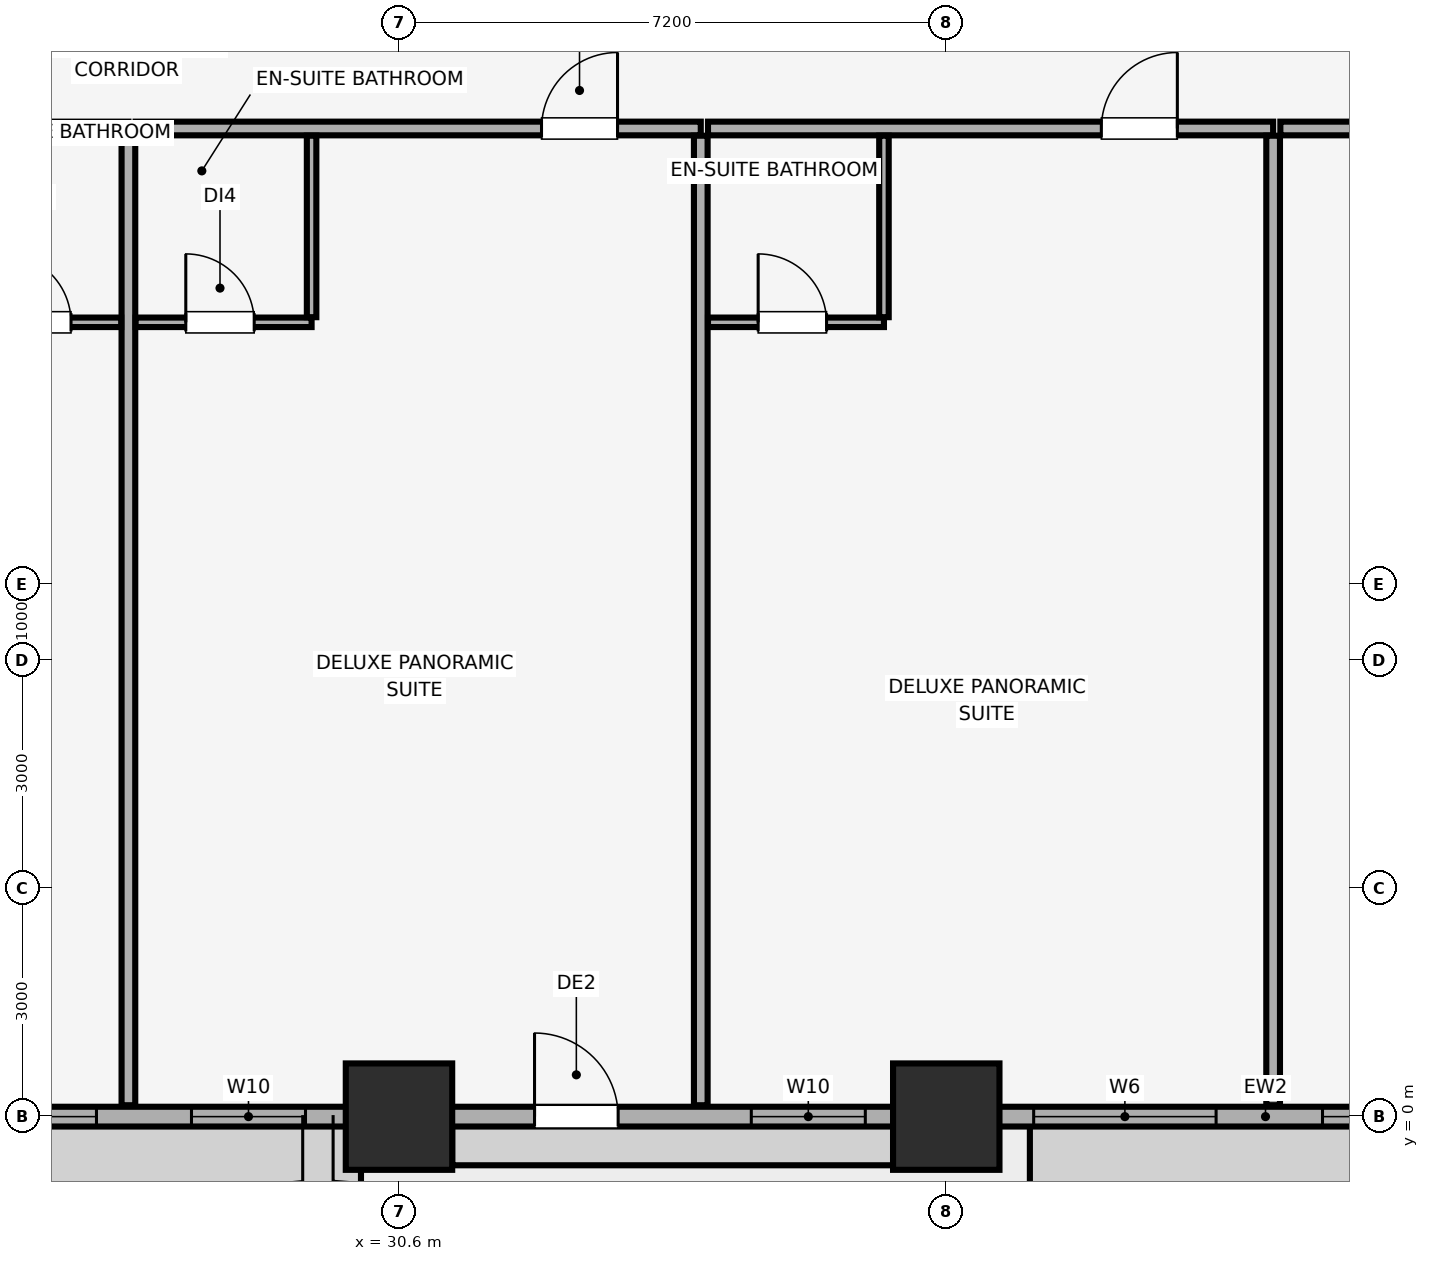
"""IFC4 building model, lengths in metres.
Left out: names, types, materials, properties, quantities, classifications, styles, units other than length and angle.
Written with IfcOpenShell. Run it as: python <this file> out.ifc"""

import sys

from ifc_helpers import new_model, si_unit, direction, frame, frame_2d, origin, origin_2d, place, context, subcontext, project, spatial, rectangle, extrude, element, fill, save


model = new_model("IFC4")
c1 = context("Model", 3, precision=1e-05, world=origin(), true_north=direction((0.0, 1.0)))
c2 = subcontext(c1, "Body", "Model", "MODEL_VIEW")
j1 = project(units=[si_unit("LENGTHUNIT", "METRE"), si_unit("PLANEANGLEUNIT", "RADIAN")], contexts=[c1])
p1 = place(None, origin())
s1 = spatial("IfcSite", under=j1, at=p1, CompositionType="ELEMENT")
p2 = place(p1, origin())
s2 = spatial("IfcBuilding", under=s1, at=p2, CompositionType="ELEMENT")
p3 = place(p2, frame((0.0, 0.0, 68.9)))
s3 = spatial("IfcBuildingStorey", under=s2, at=p3, CompositionType="ELEMENT", Elevation=68.9)
for number, where, z_axis, x_axis in (
    (1, (30.6, 0.0, 0.0), (0.0, 0.0, 1.0), (1.0, 0.0, 0.0)),
    (2, (37.8, 0.0, 0.0), (0.0, 0.0, 1.0), (1.0, 0.0, 0.0)),
):
    element("IfcColumn", number, at=place(p3, frame(where, z_axis=z_axis, x_axis=x_axis)), inside=s3, PredefinedType="COLUMN", context=c2, shape_type="SweptSolid", body=[
        extrude(rectangle(XDim=1.4, YDim=1.4, at=origin_2d()), origin(), (0.0, 0.0, 1.0), 3.51),
    ])
p4 = place(p3, frame((4.2, 0.0, 0.0), z_axis=(0.0, 0.0, 1.0), x_axis=(1.0, 0.0, 0.0)))
e3 = element("IfcWall", 3, at=p4, inside=s3, PredefinedType="SOLIDWALL", context=c2, shape_type="SweptSolid", body=[
    extrude(rectangle(XDim=75.6, YDim=0.26, at=frame_2d((37.8, 0.0))), origin(), (0.0, 0.0, 1.0), 2.56),
])
p5 = place(p4, frame((13.517, 0.0, 0.0)))
e4 = element("IfcOpeningElement", 4, at=p5, cuts=e3, PredefinedType="OPENING", context=c2, shape_type="SweptSolid", body=[
    extrude(rectangle(XDim=1.1, YDim=2.15, at=frame_2d((0.55, 1.075))), frame((0.0, 0.14, 0.0), z_axis=(0.0, -1.0, 0.0), x_axis=(1.0, 0.0, 0.0)), (0.0, 0.0, 1.0), 0.28),
])
p6 = place(p4, frame((28.183, 0.0, 0.0)))
e5 = element("IfcOpeningElement", 5, at=p6, cuts=e3, PredefinedType="OPENING", context=c2, shape_type="SweptSolid", body=[
    extrude(rectangle(XDim=1.1, YDim=2.15, at=frame_2d((0.55, 1.075))), frame((0.0, 0.14, 0.0), z_axis=(0.0, -1.0, 0.0), x_axis=(1.0, 0.0, 0.0)), (0.0, 0.0, 1.0), 0.28),
])
p7 = place(p4, frame((58.094, 0.0, 0.0)))
e6 = element("IfcOpeningElement", 6, at=p7, cuts=e3, PredefinedType="OPENING", context=c2, shape_type="SweptSolid", body=[
    extrude(rectangle(XDim=1.1, YDim=2.15, at=frame_2d((0.55, 1.075))), frame((0.0, 0.14, 0.0), z_axis=(0.0, -1.0, 0.0), x_axis=(1.0, 0.0, 0.0)), (0.0, 0.0, 1.0), 0.28),
])
p8 = place(p4, frame((1.035, 0.0, 0.85)))
e7 = element("IfcOpeningElement", 7, at=p8, cuts=e3, PredefinedType="OPENING", context=c2, shape_type="SweptSolid", body=[
    extrude(rectangle(XDim=2.4, YDim=1.5, at=frame_2d((1.2, 0.75))), frame((0.0, 0.14, 0.0), z_axis=(0.0, -1.0, 0.0), x_axis=(1.0, 0.0, 0.0)), (0.0, 0.0, 1.0), 0.28),
])
p9 = place(p4, frame((5.74, 0.0, 0.85)))
e8 = element("IfcOpeningElement", 8, at=p9, cuts=e3, PredefinedType="OPENING", context=c2, shape_type="SweptSolid", body=[
    extrude(rectangle(XDim=1.5, YDim=1.4, at=frame_2d((0.75, 0.7))), frame((0.0, 0.14, 0.0), z_axis=(0.0, -1.0, 0.0), x_axis=(1.0, 0.0, 0.0)), (0.0, 0.0, 1.0), 0.28),
])
p10 = place(p4, frame((8.49, 0.0, 0.85)))
e9 = element("IfcOpeningElement", 9, at=p10, cuts=e3, PredefinedType="OPENING", context=c2, shape_type="SweptSolid", body=[
    extrude(rectangle(XDim=2.4, YDim=1.5, at=frame_2d((1.2, 0.75))), frame((0.0, 0.14, 0.0), z_axis=(0.0, -1.0, 0.0), x_axis=(1.0, 0.0, 0.0)), (0.0, 0.0, 1.0), 0.28),
])
p11 = place(p4, frame((15.855, 0.0, 0.85)))
e10 = element("IfcOpeningElement", 10, at=p11, cuts=e3, PredefinedType="OPENING", context=c2, shape_type="SweptSolid", body=[
    extrude(rectangle(XDim=2.4, YDim=1.5, at=frame_2d((1.2, 0.75))), frame((0.0, 0.14, 0.0), z_axis=(0.0, -1.0, 0.0), x_axis=(1.0, 0.0, 0.0)), (0.0, 0.0, 1.0), 0.28),
])
p12 = place(p4, frame((20.02, 0.0, 0.85)))
e11 = element("IfcOpeningElement", 11, at=p12, cuts=e3, PredefinedType="OPENING", context=c2, shape_type="SweptSolid", body=[
    extrude(rectangle(XDim=2.4, YDim=1.5, at=frame_2d((1.2, 0.75))), frame((0.0, 0.14, 0.0), z_axis=(0.0, -1.0, 0.0), x_axis=(1.0, 0.0, 0.0)), (0.0, 0.0, 1.0), 0.28),
])
p13 = place(p4, frame((23.67, 0.0, 0.85)))
e12 = element("IfcOpeningElement", 12, at=p13, cuts=e3, PredefinedType="OPENING", context=c2, shape_type="SweptSolid", body=[
    extrude(rectangle(XDim=1.5, YDim=1.4, at=frame_2d((0.75, 0.7))), frame((0.0, 0.14, 0.0), z_axis=(0.0, -1.0, 0.0), x_axis=(1.0, 0.0, 0.0)), (0.0, 0.0, 1.0), 0.28),
])
p14 = place(p4, frame((31.035, 0.0, 0.85)))
e13 = element("IfcOpeningElement", 13, at=p14, cuts=e3, PredefinedType="OPENING", context=c2, shape_type="SweptSolid", body=[
    extrude(rectangle(XDim=1.5, YDim=1.4, at=frame_2d((0.75, 0.7))), frame((0.0, 0.14, 0.0), z_axis=(0.0, -1.0, 0.0), x_axis=(1.0, 0.0, 0.0)), (0.0, 0.0, 1.0), 0.28),
])
p15 = place(p4, frame((34.75, 0.0, 0.85)))
e14 = element("IfcOpeningElement", 14, at=p15, cuts=e3, PredefinedType="OPENING", context=c2, shape_type="SweptSolid", body=[
    extrude(rectangle(XDim=2.4, YDim=1.5, at=frame_2d((1.2, 0.75))), frame((0.0, 0.14, 0.0), z_axis=(0.0, -1.0, 0.0), x_axis=(1.0, 0.0, 0.0)), (0.0, 0.0, 1.0), 0.28),
])
p16 = place(p4, frame((38.55, 0.0, 0.85)))
e15 = element("IfcOpeningElement", 15, at=p16, cuts=e3, PredefinedType="OPENING", context=c2, shape_type="SweptSolid", body=[
    extrude(rectangle(XDim=2.4, YDim=1.5, at=frame_2d((1.2, 0.75))), frame((0.0, 0.14, 0.0), z_axis=(0.0, -1.0, 0.0), x_axis=(1.0, 0.0, 0.0)), (0.0, 0.0, 1.0), 0.28),
])
p17 = place(p4, frame((43.165, 0.0, 0.85)))
e16 = element("IfcOpeningElement", 16, at=p17, cuts=e3, PredefinedType="OPENING", context=c2, shape_type="SweptSolid", body=[
    extrude(rectangle(XDim=1.5, YDim=1.4, at=frame_2d((0.75, 0.7))), frame((0.0, 0.14, 0.0), z_axis=(0.0, -1.0, 0.0), x_axis=(1.0, 0.0, 0.0)), (0.0, 0.0, 1.0), 0.28),
])
p18 = place(p4, frame((45.915, 0.0, 0.85)))
e17 = element("IfcOpeningElement", 17, at=p18, cuts=e3, PredefinedType="OPENING", context=c2, shape_type="SweptSolid", body=[
    extrude(rectangle(XDim=2.4, YDim=1.5, at=frame_2d((1.2, 0.75))), frame((0.0, 0.14, 0.0), z_axis=(0.0, -1.0, 0.0), x_axis=(1.0, 0.0, 0.0)), (0.0, 0.0, 1.0), 0.28),
])
p19 = place(p4, frame((50.081, 0.0, 0.85)))
e18 = element("IfcOpeningElement", 18, at=p19, cuts=e3, PredefinedType="OPENING", context=c2, shape_type="SweptSolid", body=[
    extrude(rectangle(XDim=2.4, YDim=1.5, at=frame_2d((1.2, 0.75))), frame((0.0, 0.14, 0.0), z_axis=(0.0, -1.0, 0.0), x_axis=(1.0, 0.0, 0.0)), (0.0, 0.0, 1.0), 0.28),
])
p20 = place(p4, frame((53.73, 0.0, 0.85)))
e19 = element("IfcOpeningElement", 19, at=p20, cuts=e3, PredefinedType="OPENING", context=c2, shape_type="SweptSolid", body=[
    extrude(rectangle(XDim=1.5, YDim=1.4, at=frame_2d((0.75, 0.7))), frame((0.0, 0.14, 0.0), z_axis=(0.0, -1.0, 0.0), x_axis=(1.0, 0.0, 0.0)), (0.0, 0.0, 1.0), 0.28),
])
p21 = place(p4, frame((61.095, 0.0, 0.85)))
e20 = element("IfcOpeningElement", 20, at=p21, cuts=e3, PredefinedType="OPENING", context=c2, shape_type="SweptSolid", body=[
    extrude(rectangle(XDim=1.5, YDim=1.4, at=frame_2d((0.75, 0.7))), frame((0.0, 0.14, 0.0), z_axis=(0.0, -1.0, 0.0), x_axis=(1.0, 0.0, 0.0)), (0.0, 0.0, 1.0), 0.28),
])
p22 = place(p4, frame((64.76, 0.0, 0.85)))
e21 = element("IfcOpeningElement", 21, at=p22, cuts=e3, PredefinedType="OPENING", context=c2, shape_type="SweptSolid", body=[
    extrude(rectangle(XDim=2.4, YDim=1.5, at=frame_2d((1.2, 0.75))), frame((0.0, 0.14, 0.0), z_axis=(0.0, -1.0, 0.0), x_axis=(1.0, 0.0, 0.0)), (0.0, 0.0, 1.0), 0.28),
])
p23 = place(p4, frame((68.41, 0.0, 0.85)))
e22 = element("IfcOpeningElement", 22, at=p23, cuts=e3, PredefinedType="OPENING", context=c2, shape_type="SweptSolid", body=[
    extrude(rectangle(XDim=1.5, YDim=1.4, at=frame_2d((0.75, 0.7))), frame((0.0, 0.14, 0.0), z_axis=(0.0, -1.0, 0.0), x_axis=(1.0, 0.0, 0.0)), (0.0, 0.0, 1.0), 0.28),
])
p24 = place(p4, frame((72.165, 0.0, 0.85)))
e23 = element("IfcOpeningElement", 23, at=p24, cuts=e3, PredefinedType="OPENING", context=c2, shape_type="SweptSolid", body=[
    extrude(rectangle(XDim=2.4, YDim=1.5, at=frame_2d((1.2, 0.75))), frame((0.0, 0.14, 0.0), z_axis=(0.0, -1.0, 0.0), x_axis=(1.0, 0.0, 0.0)), (0.0, 0.0, 1.0), 0.28),
])
p25 = place(p3, frame((19.605, 13.0, 0.0), z_axis=(0.0, 0.0, 1.0), x_axis=(1.0, 0.0, 0.0)))
e24 = element("IfcWall", 24, at=p25, inside=s3, PredefinedType="PARTITIONING", context=c2, shape_type="SweptSolid", body=[
    extrude(rectangle(XDim=7.435, YDim=0.18, at=frame_2d((3.718, 0.0))), origin(), (0.0, 0.0, 1.0), 3.51),
])
p26 = place(p25, frame((0.96, 0.0, 0.0)))
e25 = element("IfcOpeningElement", 25, at=p26, cuts=e24, PredefinedType="OPENING", context=c2, shape_type="SweptSolid", body=[
    extrude(rectangle(XDim=1.0, YDim=2.15, at=frame_2d((0.5, 1.075))), frame((0.0, 0.1, 0.0), z_axis=(0.0, -1.0, 0.0), x_axis=(1.0, 0.0, 0.0)), (0.0, 0.0, 1.0), 0.2),
])
p27 = place(p3, frame((27.04, 0.15, 0.0), z_axis=(0.0, 0.0, 1.0), x_axis=(0.0, 1.0, 0.0)))
e26 = element("IfcWall", 26, at=p27, inside=s3, PredefinedType="PARTITIONING", context=c2, shape_type="SweptSolid", body=[
    extrude(rectangle(XDim=12.755, YDim=0.18, at=frame_2d((6.377, 0.0))), origin(), (0.0, 0.0, 1.0), 2.898),
])
p28 = place(p3, frame((24.63, 10.45, 0.0), z_axis=(0.0, 0.0, 1.0), x_axis=(1.0, 0.0, 0.0)))
e27 = element("IfcWall", 27, at=p28, inside=s3, PredefinedType="PARTITIONING", context=c2, shape_type="SweptSolid", body=[
    extrude(rectangle(XDim=2.315, YDim=0.125, at=frame_2d((1.158, 0.0))), origin(), (0.0, 0.0, 1.0), 3.51),
])
p29 = place(p28, frame((0.755, 0.0, 0.0)))
e28 = element("IfcOpeningElement", 28, at=p29, cuts=e27, PredefinedType="OPENING", context=c2, shape_type="SweptSolid", body=[
    extrude(rectangle(XDim=0.9, YDim=2.1, at=frame_2d((0.45, 1.05))), frame((0.0, 0.073, 0.0), z_axis=(0.0, -1.0, 0.0), x_axis=(1.0, 0.0, 0.0)), (0.0, 0.0, 1.0), 0.145),
])
p30 = place(p3, frame((27.135, 13.0, 0.0), z_axis=(0.0, 0.0, 1.0), x_axis=(1.0, 0.0, 0.0)))
e29 = element("IfcWall", 29, at=p30, inside=s3, PredefinedType="PARTITIONING", context=c2, shape_type="SweptSolid", body=[
    extrude(rectangle(XDim=7.435, YDim=0.18, at=frame_2d((3.718, 0.0))), origin(), (0.0, 0.0, 1.0), 3.51),
])
p31 = place(p30, frame((5.34, 0.0, 0.0)))
e30 = element("IfcOpeningElement", 30, at=p31, cuts=e29, PredefinedType="OPENING", context=c2, shape_type="SweptSolid", body=[
    extrude(rectangle(XDim=1.0, YDim=2.15, at=frame_2d((0.5, 1.075))), frame((0.0, 0.1, 0.0), z_axis=(0.0, -1.0, 0.0), x_axis=(1.0, 0.0, 0.0)), (0.0, 0.0, 1.0), 0.2),
])
p32 = place(p3, frame((34.57, 0.15, 0.0), z_axis=(0.0, 0.0, 1.0), x_axis=(0.0, 1.0, 0.0)))
e31 = element("IfcWall", 31, at=p32, inside=s3, PredefinedType="PARTITIONING", context=c2, shape_type="SweptSolid", body=[
    extrude(rectangle(XDim=12.755, YDim=0.18, at=frame_2d((6.377, 0.0))), origin(), (0.0, 0.0, 1.0), 3.51),
])
p33 = place(p3, frame((27.135, 10.45, 0.0), z_axis=(0.0, 0.0, 1.0), x_axis=(1.0, 0.0, 0.0)))
e32 = element("IfcWall", 32, at=p33, inside=s3, PredefinedType="PARTITIONING", context=c2, shape_type="SweptSolid", body=[
    extrude(rectangle(XDim=2.315, YDim=0.125, at=frame_2d((1.157, 0.0))), origin(), (0.0, 0.0, 1.0), 3.51),
])
p34 = place(p33, frame((0.66, 0.0, 0.0)))
e33 = element("IfcOpeningElement", 33, at=p34, cuts=e32, PredefinedType="OPENING", context=c2, shape_type="SweptSolid", body=[
    extrude(rectangle(XDim=0.9, YDim=2.1, at=frame_2d((0.45, 1.05))), frame((0.0, 0.073, 0.0), z_axis=(0.0, -1.0, 0.0), x_axis=(1.0, 0.0, 0.0)), (0.0, 0.0, 1.0), 0.145),
])
p35 = place(p3, frame((29.45, 10.518, 0.0), z_axis=(0.0, 0.0, 1.0), x_axis=(0.0, 1.0, 0.0)))
e34 = element("IfcWall", 34, at=p35, inside=s3, PredefinedType="PARTITIONING", context=c2, shape_type="SweptSolid", body=[
    extrude(rectangle(XDim=2.387, YDim=0.125, at=frame_2d((1.194, 0.0))), origin(), (0.0, 0.0, 1.0), 3.51),
])
p36 = place(p3, frame((34.665, 13.0, 0.0), z_axis=(0.0, 0.0, 1.0), x_axis=(1.0, 0.0, 0.0)))
e35 = element("IfcWall", 35, at=p36, inside=s3, PredefinedType="PARTITIONING", context=c2, shape_type="SweptSolid", body=[
    extrude(rectangle(XDim=7.435, YDim=0.18, at=frame_2d((3.718, 0.0))), origin(), (0.0, 0.0, 1.0), 3.51),
])
p37 = place(p36, frame((5.175, 0.0, 0.0)))
e36 = element("IfcOpeningElement", 36, at=p37, cuts=e35, PredefinedType="OPENING", context=c2, shape_type="SweptSolid", body=[
    extrude(rectangle(XDim=1.0, YDim=2.15, at=frame_2d((0.5, 1.075))), frame((0.0, 0.1, 0.0), z_axis=(0.0, -1.0, 0.0), x_axis=(1.0, 0.0, 0.0)), (0.0, 0.0, 1.0), 0.2),
])
p38 = place(p3, frame((42.1, 0.15, 0.0), z_axis=(0.0, 0.0, 1.0), x_axis=(0.0, 1.0, 0.0)))
e37 = element("IfcWall", 37, at=p38, inside=s3, PredefinedType="PARTITIONING", context=c2, shape_type="SweptSolid", body=[
    extrude(rectangle(XDim=12.755, YDim=0.18, at=frame_2d((6.377, 0.0))), origin(), (0.0, 0.0, 1.0), 2.898),
])
p39 = place(p3, frame((34.665, 10.45, 0.0), z_axis=(0.0, 0.0, 1.0), x_axis=(1.0, 0.0, 0.0)))
e38 = element("IfcWall", 38, at=p39, inside=s3, PredefinedType="PARTITIONING", context=c2, shape_type="SweptSolid", body=[
    extrude(rectangle(XDim=2.315, YDim=0.125, at=frame_2d((1.157, 0.0))), origin(), (0.0, 0.0, 1.0), 3.51),
])
p40 = place(p39, frame((0.66, 0.0, 0.0)))
e39 = element("IfcOpeningElement", 39, at=p40, cuts=e38, PredefinedType="OPENING", context=c2, shape_type="SweptSolid", body=[
    extrude(rectangle(XDim=0.9, YDim=2.1, at=frame_2d((0.45, 1.05))), frame((0.0, 0.073, 0.0), z_axis=(0.0, -1.0, 0.0), x_axis=(1.0, 0.0, 0.0)), (0.0, 0.0, 1.0), 0.145),
])
p41 = place(p3, frame((36.98, 10.518, 0.0), z_axis=(0.0, 0.0, 1.0), x_axis=(0.0, 1.0, 0.0)))
e40 = element("IfcWall", 40, at=p41, inside=s3, PredefinedType="PARTITIONING", context=c2, shape_type="SweptSolid", body=[
    extrude(rectangle(XDim=2.387, YDim=0.125, at=frame_2d((1.194, 0.0))), origin(), (0.0, 0.0, 1.0), 3.51),
])
p42 = place(p3, frame((42.195, 13.0, 0.0), z_axis=(0.0, 0.0, 1.0), x_axis=(1.0, 0.0, 0.0)))
e41 = element("IfcWall", 41, at=p42, inside=s3, PredefinedType="PARTITIONING", context=c2, shape_type="SweptSolid", body=[
    extrude(rectangle(XDim=7.435, YDim=0.18, at=frame_2d((3.718, 0.0))), origin(), (0.0, 0.0, 1.0), 3.51),
])
p43 = place(p42, frame((1.065, 0.0, 0.0)))
e42 = element("IfcOpeningElement", 42, at=p43, cuts=e41, PredefinedType="OPENING", context=c2, shape_type="SweptSolid", body=[
    extrude(rectangle(XDim=1.0, YDim=2.15, at=frame_2d((0.5, 1.075))), frame((0.0, 0.1, 0.0), z_axis=(0.0, -1.0, 0.0), x_axis=(1.0, 0.0, 0.0)), (0.0, 0.0, 1.0), 0.2),
])
p44 = place(p6, origin())
e43 = element("IfcDoor", 43, at=p44, inside=s3, OperationType="SINGLE_SWING_LEFT", PredefinedType="DOOR", context=c2, shape_type="SweptSolid", body=[
    extrude(rectangle(XDim=1.1, YDim=2.15, at=frame_2d((0.55, 1.075))), frame((0.0, 0.025, 0.0), z_axis=(0.0, -1.0, 0.0), x_axis=(1.0, 0.0, 0.0)), (0.0, 0.0, 1.0), 0.05),
])
fill(e5, e43)
p45 = place(p12, origin())
e44 = element("IfcWindow", 44, at=p45, inside=s3, PartitioningType="SINGLE_PANEL", PredefinedType="WINDOW", context=c2, shape_type="SweptSolid", body=[
    extrude(rectangle(XDim=2.4, YDim=1.5, at=frame_2d((1.2, 0.75))), frame((0.0, 0.03, 0.0), z_axis=(0.0, -1.0, 0.0), x_axis=(1.0, 0.0, 0.0)), (0.0, 0.0, 1.0), 0.06),
])
fill(e11, e44)
p46 = place(p13, origin())
e45 = element("IfcWindow", 45, at=p46, inside=s3, PartitioningType="SINGLE_PANEL", PredefinedType="WINDOW", context=c2, shape_type="SweptSolid", body=[
    extrude(rectangle(XDim=1.5, YDim=1.4, at=frame_2d((0.75, 0.7))), frame((0.0, 0.03, 0.0), z_axis=(0.0, -1.0, 0.0), x_axis=(1.0, 0.0, 0.0)), (0.0, 0.0, 1.0), 0.06),
])
fill(e12, e45)
p47 = place(p14, origin())
e46 = element("IfcWindow", 46, at=p47, inside=s3, PartitioningType="SINGLE_PANEL", PredefinedType="WINDOW", context=c2, shape_type="SweptSolid", body=[
    extrude(rectangle(XDim=1.5, YDim=1.4, at=frame_2d((0.75, 0.7))), frame((0.0, 0.03, 0.0), z_axis=(0.0, -1.0, 0.0), x_axis=(1.0, 0.0, 0.0)), (0.0, 0.0, 1.0), 0.06),
])
fill(e13, e46)
p48 = place(p15, origin())
e47 = element("IfcWindow", 47, at=p48, inside=s3, PartitioningType="SINGLE_PANEL", PredefinedType="WINDOW", context=c2, shape_type="SweptSolid", body=[
    extrude(rectangle(XDim=2.4, YDim=1.5, at=frame_2d((1.2, 0.75))), frame((0.0, 0.03, 0.0), z_axis=(0.0, -1.0, 0.0), x_axis=(1.0, 0.0, 0.0)), (0.0, 0.0, 1.0), 0.06),
])
fill(e14, e47)
p49 = place(p16, origin())
e48 = element("IfcWindow", 48, at=p49, inside=s3, PartitioningType="SINGLE_PANEL", PredefinedType="WINDOW", context=c2, shape_type="SweptSolid", body=[
    extrude(rectangle(XDim=2.4, YDim=1.5, at=frame_2d((1.2, 0.75))), frame((0.0, 0.03, 0.0), z_axis=(0.0, -1.0, 0.0), x_axis=(1.0, 0.0, 0.0)), (0.0, 0.0, 1.0), 0.06),
])
fill(e15, e48)
p50 = place(p29, origin())
e49 = element("IfcDoor", 49, at=p50, inside=s3, OperationType="SINGLE_SWING_LEFT", PredefinedType="DOOR", context=c2, shape_type="SweptSolid", body=[
    extrude(rectangle(XDim=0.9, YDim=2.1, at=frame_2d((0.45, 1.05))), frame((0.0, 0.025, 0.0), z_axis=(0.0, -1.0, 0.0), x_axis=(1.0, 0.0, 0.0)), (0.0, 0.0, 1.0), 0.05),
])
fill(e28, e49)
p51 = place(p31, origin())
e50 = element("IfcDoor", 50, at=p51, inside=s3, OperationType="SINGLE_SWING_RIGHT", PredefinedType="DOOR", context=c2, shape_type="SweptSolid", body=[
    extrude(rectangle(XDim=1.0, YDim=2.15, at=frame_2d((0.5, 1.075))), frame((0.0, 0.025, 0.0), z_axis=(0.0, -1.0, 0.0), x_axis=(1.0, 0.0, 0.0)), (0.0, 0.0, 1.0), 0.05),
])
fill(e30, e50)
p52 = place(p34, origin())
e51 = element("IfcDoor", 51, at=p52, inside=s3, OperationType="SINGLE_SWING_LEFT", PredefinedType="DOOR", context=c2, shape_type="SweptSolid", body=[
    extrude(rectangle(XDim=0.9, YDim=2.1, at=frame_2d((0.45, 1.05))), frame((0.0, 0.025, 0.0), z_axis=(0.0, -1.0, 0.0), x_axis=(1.0, 0.0, 0.0)), (0.0, 0.0, 1.0), 0.05),
])
fill(e33, e51)
p53 = place(p37, origin())
e52 = element("IfcDoor", 52, at=p53, inside=s3, OperationType="SINGLE_SWING_RIGHT", PredefinedType="DOOR", context=c2, shape_type="SweptSolid", body=[
    extrude(rectangle(XDim=1.0, YDim=2.15, at=frame_2d((0.5, 1.075))), frame((0.0, 0.025, 0.0), z_axis=(0.0, -1.0, 0.0), x_axis=(1.0, 0.0, 0.0)), (0.0, 0.0, 1.0), 0.05),
])
fill(e36, e52)
p54 = place(p40, origin())
e53 = element("IfcDoor", 53, at=p54, inside=s3, OperationType="SINGLE_SWING_LEFT", PredefinedType="DOOR", context=c2, shape_type="SweptSolid", body=[
    extrude(rectangle(XDim=0.9, YDim=2.1, at=frame_2d((0.45, 1.05))), frame((0.0, 0.025, 0.0), z_axis=(0.0, -1.0, 0.0), x_axis=(1.0, 0.0, 0.0)), (0.0, 0.0, 1.0), 0.05),
])
fill(e39, e53)
save(model, sys.argv[1])
